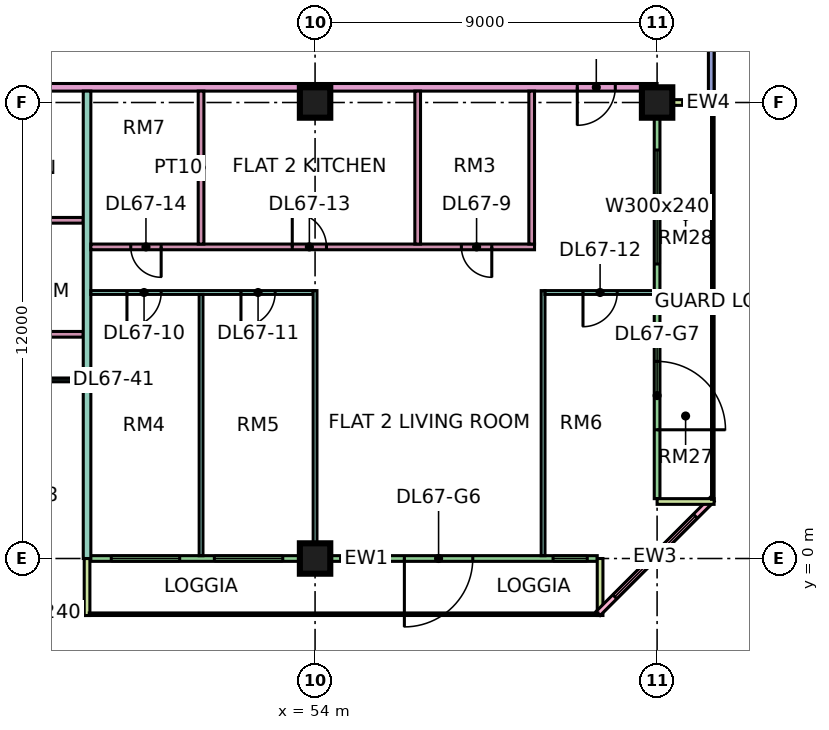
"""IFC4 building model, lengths in metres.
Left out: names, types, materials, properties, quantities, classifications, styles, units other than length and angle.
Written with IfcOpenShell. Run it as: python <this file> out.ifc"""

import sys

from ifc_helpers import new_model, si_unit, direction, frame, frame_2d, origin, origin_2d, place, context, subcontext, project, spatial, rectangle, extrude, element, fill, save


model = new_model("IFC4")
c1 = context("Model", 3, precision=1e-05, world=origin(), true_north=direction((0.0, 1.0)))
c2 = subcontext(c1, "Body", "Model", "MODEL_VIEW")
j1 = project(units=[si_unit("LENGTHUNIT", "METRE"), si_unit("PLANEANGLEUNIT", "RADIAN")], contexts=[c1])
p1 = place(None, origin())
s1 = spatial("IfcSite", under=j1, at=p1, CompositionType="ELEMENT")
p2 = place(p1, origin())
s2 = spatial("IfcBuilding", under=s1, at=p2, CompositionType="ELEMENT")
p3 = place(p2, frame((0.0, 0.0, 288.4)))
s3 = spatial("IfcBuildingStorey", under=s2, at=p3, CompositionType="ELEMENT", Elevation=288.4)
for number, where, z_axis, x_axis in (
    (1, (54.0, 0.0, 0.0), (0.0, 0.0, 1.0), (1.0, 0.0, 0.0)),
    (2, (54.0, 12.0, 0.0), (0.0, 0.0, 1.0), (1.0, 0.0, 0.0)),
    (3, (63.0, 12.0, 0.0), (0.0, 0.0, 1.0), (1.0, 0.0, 0.0)),
):
    element("IfcColumn", number, at=place(p3, frame(where, z_axis=z_axis, x_axis=x_axis)), inside=s3, PredefinedType="COLUMN", context=c2, shape_type="SweptSolid", body=[
        extrude(rectangle(XDim=0.8, YDim=0.8, at=origin_2d()), origin(), (0.0, 0.0, 1.0), 3.75),
    ])
p4 = place(p3, frame((36.075, -1.425, 0.0), z_axis=(0.0, 0.0, 1.0), x_axis=(1.0, 0.0, 0.0)))
e4 = element("IfcWall", 4, at=p4, inside=s3, PredefinedType="SOLIDWALL", context=c2, shape_type="SweptSolid", body=[
    extrude(rectangle(XDim=11.85, YDim=0.15, at=frame_2d((5.925, 0.0))), origin(), (0.0, 0.0, 1.0), 3.35),
])
p5 = place(p4, frame((1.462, 0.0, 0.45)))
e5 = element("IfcOpeningElement", 5, at=p5, cuts=e4, PredefinedType="OPENING", context=c2, shape_type="SweptSolid", body=[
    extrude(rectangle(XDim=3.0, YDim=2.4, at=frame_2d((1.5, 1.2))), frame((0.0, 0.085, 0.0), z_axis=(0.0, -1.0, 0.0), x_axis=(1.0, 0.0, 0.0)), (0.0, 0.0, 1.0), 0.17),
])
p6 = place(p4, frame((6.525, 0.0, 0.45)))
e6 = element("IfcOpeningElement", 6, at=p6, cuts=e4, PredefinedType="OPENING", context=c2, shape_type="SweptSolid", body=[
    extrude(rectangle(XDim=1.8, YDim=2.4, at=frame_2d((0.9, 1.2))), frame((0.0, 0.085, 0.0), z_axis=(0.0, -1.0, 0.0), x_axis=(1.0, 0.0, 0.0)), (0.0, 0.0, 1.0), 0.17),
])
p7 = place(p4, frame((9.488, 0.0, 0.45)))
e7 = element("IfcOpeningElement", 7, at=p7, cuts=e4, PredefinedType="OPENING", context=c2, shape_type="SweptSolid", body=[
    extrude(rectangle(XDim=1.8, YDim=2.4, at=frame_2d((0.9, 1.2))), frame((0.0, 0.085, 0.0), z_axis=(0.0, -1.0, 0.0), x_axis=(1.0, 0.0, 0.0)), (0.0, 0.0, 1.0), 0.17),
])
p8 = place(p3, frame((48.075, 0.0, 0.0), z_axis=(0.0, 0.0, 1.0), x_axis=(1.0, 0.0, 0.0)))
e8 = element("IfcWall", 8, at=p8, inside=s3, PredefinedType="SOLIDWALL", context=c2, shape_type="SweptSolid", body=[
    extrude(rectangle(XDim=13.35, YDim=0.15, at=frame_2d((6.675, 0.0))), origin(), (0.0, 0.0, 1.0), 3.35),
])
p9 = place(p8, frame((0.562, 0.0, 0.45)))
e9 = element("IfcOpeningElement", 9, at=p9, cuts=e8, PredefinedType="OPENING", context=c2, shape_type="SweptSolid", body=[
    extrude(rectangle(XDim=1.8, YDim=2.4, at=frame_2d((0.9, 1.2))), frame((0.0, 0.085, 0.0), z_axis=(0.0, -1.0, 0.0), x_axis=(1.0, 0.0, 0.0)), (0.0, 0.0, 1.0), 0.17),
])
p10 = place(p8, frame((3.275, 0.0, 0.45)))
e10 = element("IfcOpeningElement", 10, at=p10, cuts=e8, PredefinedType="OPENING", context=c2, shape_type="SweptSolid", body=[
    extrude(rectangle(XDim=1.8, YDim=2.4, at=frame_2d((0.9, 1.2))), frame((0.0, 0.085, 0.0), z_axis=(0.0, -1.0, 0.0), x_axis=(1.0, 0.0, 0.0)), (0.0, 0.0, 1.0), 0.17),
])
p11 = place(p8, frame((8.275, 0.0, 0.0)))
e11 = element("IfcOpeningElement", 11, at=p11, cuts=e8, PredefinedType="OPENING", context=c2, shape_type="SweptSolid", body=[
    extrude(rectangle(XDim=1.8, YDim=2.4, at=frame_2d((0.9, 1.2))), frame((0.0, 0.085, 0.0), z_axis=(0.0, -1.0, 0.0), x_axis=(1.0, 0.0, 0.0)), (0.0, 0.0, 1.0), 0.17),
])
p12 = place(p8, frame((12.188, 0.0, 0.45)))
e12 = element("IfcOpeningElement", 12, at=p12, cuts=e8, PredefinedType="OPENING", context=c2, shape_type="SweptSolid", body=[
    extrude(rectangle(XDim=0.9, YDim=2.4, at=frame_2d((0.45, 1.2))), frame((0.0, 0.085, 0.0), z_axis=(0.0, -1.0, 0.0), x_axis=(1.0, 0.0, 0.0)), (0.0, 0.0, 1.0), 0.17),
])
for number, where, z_axis, x_axis in (
    (13, (48.0, -1.5, 0.0), (0.0, 0.0, 1.0), (0.0, 1.0, 0.0)),
    (14, (61.5, -1.5, 0.0), (0.0, 0.0, 1.0), (0.0, 1.0, 0.0)),
):
    element("IfcWall", number, at=place(p3, frame(where, z_axis=z_axis, x_axis=x_axis)), inside=s3, PredefinedType="SOLIDWALL", context=c2, shape_type="SweptSolid", body=[
        extrude(rectangle(XDim=1.5, YDim=0.15, at=frame_2d((0.75, 0.0))), origin(), (0.0, 0.0, 1.0), 3.35),
    ])
p13 = place(p3, frame((61.447, -1.447, 0.0), z_axis=(0.0, 0.0, 1.0), x_axis=(0.707106781187, 0.707106781187, 0.0)))
e15 = element("IfcWall", 15, at=p13, inside=s3, PredefinedType="SOLIDWALL", context=c2, shape_type="SweptSolid", body=[
    extrude(rectangle(XDim=4.243, YDim=0.15, at=frame_2d((2.121, 0.0))), origin(), (0.0, 0.0, 1.0), 3.35),
])
p14 = place(p13, frame((0.621, 0.0, 0.45)))
e16 = element("IfcOpeningElement", 16, at=p14, cuts=e15, PredefinedType="OPENING", context=c2, shape_type="SweptSolid", body=[
    extrude(rectangle(XDim=3.0, YDim=2.4, at=frame_2d((1.5, 1.2))), frame((0.0, 0.085, 0.0), z_axis=(0.0, -1.0, 0.0), x_axis=(1.0, 0.0, 0.0)), (0.0, 0.0, 1.0), 0.17),
])
p15 = place(p3, frame((63.0, 1.575, 0.0), z_axis=(0.0, 0.0, 1.0), x_axis=(0.0, 1.0, 0.0)))
e17 = element("IfcWall", 17, at=p15, inside=s3, PredefinedType="SOLIDWALL", context=c2, shape_type="SweptSolid", body=[
    extrude(rectangle(XDim=10.35, YDim=0.15, at=frame_2d((5.175, 0.0))), origin(), (0.0, 0.0, 1.0), 3.35),
])
p16 = place(p15, frame((1.812, 0.0, 0.0)))
e18 = element("IfcOpeningElement", 18, at=p16, cuts=e17, PredefinedType="OPENING", context=c2, shape_type="SweptSolid", body=[
    extrude(rectangle(XDim=1.8, YDim=2.4, at=frame_2d((0.9, 1.2))), frame((0.0, 0.085, 0.0), z_axis=(0.0, -1.0, 0.0), x_axis=(1.0, 0.0, 0.0)), (0.0, 0.0, 1.0), 0.17),
])
p17 = place(p15, frame((6.175, 0.0, 0.45)))
e19 = element("IfcOpeningElement", 19, at=p17, cuts=e17, PredefinedType="OPENING", context=c2, shape_type="SweptSolid", body=[
    extrude(rectangle(XDim=3.0, YDim=2.4, at=frame_2d((1.5, 1.2))), frame((0.0, 0.085, 0.0), z_axis=(0.0, -1.0, 0.0), x_axis=(1.0, 0.0, 0.0)), (0.0, 0.0, 1.0), 0.17),
])
for number, where, z_axis, x_axis in (
    (20, (64.5, 1.5, 0.0), (0.0, 0.0, 1.0), (-1.0, 0.0, 0.0)),
    (21, (64.5, 12.0, 0.0), (0.0, 0.0, 1.0), (-1.0, 0.0, 0.0)),
):
    element("IfcWall", number, at=place(p3, frame(where, z_axis=z_axis, x_axis=x_axis)), inside=s3, PredefinedType="SOLIDWALL", context=c2, shape_type="SweptSolid", body=[
        extrude(rectangle(XDim=1.5, YDim=0.15, at=frame_2d((0.75, 0.0))), origin(), (0.0, 0.0, 1.0), 3.35),
    ])
p18 = place(p3, frame((64.425, 12.075, 0.0), z_axis=(0.0, 0.0, 1.0), x_axis=(0.0, 1.0, 0.0)))
e22 = element("IfcWall", 22, at=p18, inside=s3, PredefinedType="SOLIDWALL", context=c2, shape_type="SweptSolid", body=[
    extrude(rectangle(XDim=10.425, YDim=0.15, at=frame_2d((5.212, 0.0))), origin(), (0.0, 0.0, 1.0), 3.35),
])
p19 = place(p18, frame((4.125, 0.0, 0.45)))
e23 = element("IfcOpeningElement", 23, at=p19, cuts=e22, PredefinedType="OPENING", context=c2, shape_type="SweptSolid", body=[
    extrude(rectangle(XDim=3.0, YDim=2.4, at=frame_2d((1.5, 1.2))), frame((0.0, 0.085, 0.0), z_axis=(0.0, -1.0, 0.0), x_axis=(1.0, 0.0, 0.0)), (0.0, 0.0, 1.0), 0.17),
])
p20 = place(p18, frame((8.175, 0.0, 0.45)))
e24 = element("IfcOpeningElement", 24, at=p20, cuts=e22, PredefinedType="OPENING", context=c2, shape_type="SweptSolid", body=[
    extrude(rectangle(XDim=1.8, YDim=2.4, at=frame_2d((0.9, 1.2))), frame((0.0, 0.085, 0.0), z_axis=(0.0, -1.0, 0.0), x_axis=(1.0, 0.0, 0.0)), (0.0, 0.0, 1.0), 0.17),
])
p21 = place(p3, frame((33.05, 4.7, 0.0), z_axis=(0.0, 0.0, 1.0), x_axis=(1.0, 0.0, 0.0)))
e25 = element("IfcWall", 25, at=p21, inside=s3, PredefinedType="PARTITIONING", context=c2, shape_type="SweptSolid", body=[
    extrude(rectangle(XDim=14.85, YDim=0.1, at=frame_2d((7.425, 0.0))), origin(), (0.0, 0.0, 1.0), 3.35),
])
p22 = place(p21, frame((10.0, 0.0, 0.0)))
e26 = element("IfcOpeningElement", 26, at=p22, cuts=e25, PredefinedType="OPENING", context=c2, shape_type="SweptSolid", body=[
    extrude(rectangle(XDim=0.9, YDim=2.1, at=frame_2d((0.45, 1.05))), frame((0.0, 0.06, 0.0), z_axis=(0.0, -1.0, 0.0), x_axis=(1.0, 0.0, 0.0)), (0.0, 0.0, 1.0), 0.12),
])
p23 = place(p21, frame((13.0, 0.0, 0.0)))
e27 = element("IfcOpeningElement", 27, at=p23, cuts=e25, PredefinedType="OPENING", context=c2, shape_type="SweptSolid", body=[
    extrude(rectangle(XDim=0.9, YDim=2.1, at=frame_2d((0.45, 1.05))), frame((0.0, 0.06, 0.0), z_axis=(0.0, -1.0, 0.0), x_axis=(1.0, 0.0, 0.0)), (0.0, 0.0, 1.0), 0.12),
])
p24 = place(p21, frame((4.0, 0.0, 0.0)))
e28 = element("IfcOpeningElement", 28, at=p24, cuts=e25, PredefinedType="OPENING", context=c2, shape_type="SweptSolid", body=[
    extrude(rectangle(XDim=0.9, YDim=2.1, at=frame_2d((0.45, 1.05))), frame((0.0, 0.06, 0.0), z_axis=(0.0, -1.0, 0.0), x_axis=(1.0, 0.0, 0.0)), (0.0, 0.0, 1.0), 0.12),
])
p25 = place(p3, frame((40.65, 12.4, 0.0), z_axis=(0.0, 0.0, 1.0), x_axis=(1.0, 0.0, 0.0)))
e29 = element("IfcWall", 29, at=p25, inside=s3, PredefinedType="PARTITIONING", context=c2, shape_type="SweptSolid", body=[
    extrude(rectangle(XDim=22.35, YDim=0.2, at=frame_2d((11.175, 0.0))), origin(), (0.0, 0.0, 1.0), 3.35),
])
p26 = place(p25, frame((20.25, 0.0, 0.0)))
e30 = element("IfcOpeningElement", 30, at=p26, cuts=e29, PredefinedType="OPENING", context=c2, shape_type="SweptSolid", body=[
    extrude(rectangle(XDim=1.0, YDim=2.1, at=frame_2d((0.5, 1.05))), frame((0.0, 0.11, 0.0), z_axis=(0.0, -1.0, 0.0), x_axis=(1.0, 0.0, 0.0)), (0.0, 0.0, 1.0), 0.22),
])
p27 = place(p25, frame((1.05, 0.0, 0.0)))
e31 = element("IfcOpeningElement", 31, at=p27, cuts=e29, PredefinedType="OPENING", context=c2, shape_type="SweptSolid", body=[
    extrude(rectangle(XDim=1.0, YDim=2.1, at=frame_2d((0.5, 1.05))), frame((0.0, 0.11, 0.0), z_axis=(0.0, -1.0, 0.0), x_axis=(1.0, 0.0, 0.0)), (0.0, 0.0, 1.0), 0.22),
])
p28 = place(p3, frame((43.725, 5.9, 0.0), z_axis=(0.0, 0.0, 1.0), x_axis=(1.0, 0.0, 0.0)))
e32 = element("IfcWall", 32, at=p28, inside=s3, PredefinedType="PARTITIONING", context=c2, shape_type="SweptSolid", body=[
    extrude(rectangle(XDim=4.175, YDim=0.15, at=frame_2d((2.087, 0.0))), origin(), (0.0, 0.0, 1.0), 3.35),
])
p29 = place(p28, frame((1.675, 0.0, 0.0)))
e33 = element("IfcOpeningElement", 33, at=p29, cuts=e32, PredefinedType="OPENING", context=c2, shape_type="SweptSolid", body=[
    extrude(rectangle(XDim=0.8, YDim=2.1, at=frame_2d((0.4, 1.05))), frame((0.0, 0.085, 0.0), z_axis=(0.0, -1.0, 0.0), x_axis=(1.0, 0.0, 0.0)), (0.0, 0.0, 1.0), 0.17),
])
p30 = place(p3, frame((43.725, 8.9, 0.0), z_axis=(0.0, 0.0, 1.0), x_axis=(1.0, 0.0, 0.0)))
e34 = element("IfcWall", 34, at=p30, inside=s3, PredefinedType="PARTITIONING", context=c2, shape_type="SweptSolid", body=[
    extrude(rectangle(XDim=4.175, YDim=0.15, at=frame_2d((2.087, 0.0))), origin(), (0.0, 0.0, 1.0), 3.35),
])
p31 = place(p3, frame((48.0, 0.0, 0.0), z_axis=(0.0, 0.0, 1.0), x_axis=(0.0, 1.0, 0.0)))
e35 = element("IfcWall", 35, at=p31, inside=s3, PredefinedType="PARTITIONING", context=c2, shape_type="SweptSolid", body=[
    extrude(rectangle(XDim=12.3, YDim=0.2, at=frame_2d((6.15, 0.0))), origin(), (0.0, 0.0, 1.0), 3.35),
])
p32 = place(p3, frame((48.1, 7.0, 0.0), z_axis=(0.0, 0.0, 1.0), x_axis=(1.0, 0.0, 0.0)))
e36 = element("IfcWall", 36, at=p32, inside=s3, PredefinedType="PARTITIONING", context=c2, shape_type="SweptSolid", body=[
    extrude(rectangle(XDim=5.85, YDim=0.1, at=frame_2d((2.925, 0.0))), origin(), (0.0, 0.0, 1.0), 3.35),
])
p33 = place(p32, frame((0.95, 0.0, 0.0)))
e37 = element("IfcOpeningElement", 37, at=p33, cuts=e36, PredefinedType="OPENING", context=c2, shape_type="SweptSolid", body=[
    extrude(rectangle(XDim=0.9, YDim=2.1, at=frame_2d((0.45, 1.05))), frame((0.0, 0.06, 0.0), z_axis=(0.0, -1.0, 0.0), x_axis=(1.0, 0.0, 0.0)), (0.0, 0.0, 1.0), 0.12),
])
p34 = place(p32, frame((3.95, 0.0, 0.0)))
e38 = element("IfcOpeningElement", 38, at=p34, cuts=e36, PredefinedType="OPENING", context=c2, shape_type="SweptSolid", body=[
    extrude(rectangle(XDim=0.9, YDim=2.1, at=frame_2d((0.45, 1.05))), frame((0.0, 0.06, 0.0), z_axis=(0.0, -1.0, 0.0), x_axis=(1.0, 0.0, 0.0)), (0.0, 0.0, 1.0), 0.12),
])
p35 = place(p3, frame((48.1, 8.2, 0.0), z_axis=(0.0, 0.0, 1.0), x_axis=(1.0, 0.0, 0.0)))
e39 = element("IfcWall", 39, at=p35, inside=s3, PredefinedType="PARTITIONING", context=c2, shape_type="SweptSolid", body=[
    extrude(rectangle(XDim=11.675, YDim=0.15, at=frame_2d((5.837, 0.0))), origin(), (0.0, 0.0, 1.0), 3.35),
])
p36 = place(p35, frame((9.75, 0.0, 0.0)))
e40 = element("IfcOpeningElement", 40, at=p36, cuts=e39, PredefinedType="OPENING", context=c2, shape_type="SweptSolid", body=[
    extrude(rectangle(XDim=0.8, YDim=2.1, at=frame_2d((0.4, 1.05))), frame((0.0, 0.085, 0.0), z_axis=(0.0, -1.0, 0.0), x_axis=(1.0, 0.0, 0.0)), (0.0, 0.0, 1.0), 0.17),
])
p37 = place(p35, frame((5.3, 0.0, 0.0)))
e41 = element("IfcOpeningElement", 41, at=p37, cuts=e39, PredefinedType="OPENING", context=c2, shape_type="SweptSolid", body=[
    extrude(rectangle(XDim=0.9, YDim=2.1, at=frame_2d((0.45, 1.05))), frame((0.0, 0.085, 0.0), z_axis=(0.0, -1.0, 0.0), x_axis=(1.0, 0.0, 0.0)), (0.0, 0.0, 1.0), 0.17),
])
p38 = place(p35, frame((1.05, 0.0, 0.0)))
e42 = element("IfcOpeningElement", 42, at=p38, cuts=e39, PredefinedType="OPENING", context=c2, shape_type="SweptSolid", body=[
    extrude(rectangle(XDim=0.8, YDim=2.1, at=frame_2d((0.4, 1.05))), frame((0.0, 0.085, 0.0), z_axis=(0.0, -1.0, 0.0), x_axis=(1.0, 0.0, 0.0)), (0.0, 0.0, 1.0), 0.17),
])
p39 = place(p3, frame((51.0, 0.074, 0.0), z_axis=(0.0, 0.0, 1.0), x_axis=(0.0, 1.0, 0.0)))
e43 = element("IfcWall", 43, at=p39, inside=s3, PredefinedType="PARTITIONING", context=c2, shape_type="SweptSolid", body=[
    extrude(rectangle(XDim=6.876, YDim=0.1, at=frame_2d((3.438, 0.0))), origin(), (0.0, 0.0, 1.0), 3.35),
])
p40 = place(p3, frame((51.0, 8.275, 0.0), z_axis=(0.0, 0.0, 1.0), x_axis=(0.0, 1.0, 0.0)))
e44 = element("IfcWall", 44, at=p40, inside=s3, PredefinedType="PARTITIONING", context=c2, shape_type="SweptSolid", body=[
    extrude(rectangle(XDim=4.025, YDim=0.15, at=frame_2d((2.013, 0.0))), origin(), (0.0, 0.0, 1.0), 3.35),
])
p41 = place(p3, frame((54.0, 0.074, 0.0), z_axis=(0.0, 0.0, 1.0), x_axis=(0.0, 1.0, 0.0)))
e45 = element("IfcWall", 45, at=p41, inside=s3, PredefinedType="PARTITIONING", context=c2, shape_type="SweptSolid", body=[
    extrude(rectangle(XDim=6.976, YDim=0.1, at=frame_2d((3.488, 0.0))), origin(), (0.0, 0.0, 1.0), 3.35),
])
for number, where, z_axis, x_axis in (
    (46, (56.7, 8.275, 0.0), (0.0, 0.0, 1.0), (0.0, 1.0, 0.0)),
    (47, (59.7, 8.275, 0.0), (0.0, 0.0, 1.0), (0.0, 1.0, 0.0)),
):
    element("IfcWall", number, at=place(p3, frame(where, z_axis=z_axis, x_axis=x_axis)), inside=s3, PredefinedType="PARTITIONING", context=c2, shape_type="SweptSolid", body=[
        extrude(rectangle(XDim=4.025, YDim=0.15, at=frame_2d((2.013, 0.0))), origin(), (0.0, 0.0, 1.0), 3.35),
    ])
p42 = place(p3, frame((60.0, 0.074, 0.0), z_axis=(0.0, 0.0, 1.0), x_axis=(0.0, 1.0, 0.0)))
e48 = element("IfcWall", 48, at=p42, inside=s3, PredefinedType="PARTITIONING", context=c2, shape_type="SweptSolid", body=[
    extrude(rectangle(XDim=6.976, YDim=0.1, at=frame_2d((3.488, 0.0))), origin(), (0.0, 0.0, 1.0), 3.35),
])
p43 = place(p3, frame((60.05, 7.0, 0.0), z_axis=(0.0, 0.0, 1.0), x_axis=(1.0, 0.0, 0.0)))
e49 = element("IfcWall", 49, at=p43, inside=s3, PredefinedType="PARTITIONING", context=c2, shape_type="SweptSolid", body=[
    extrude(rectangle(XDim=2.876, YDim=0.1, at=frame_2d((1.438, 0.0))), origin(), (0.0, 0.0, 1.0), 3.35),
])
p44 = place(p43, frame((1.0, 0.0, 0.0)))
e50 = element("IfcOpeningElement", 50, at=p44, cuts=e49, PredefinedType="OPENING", context=c2, shape_type="SweptSolid", body=[
    extrude(rectangle(XDim=0.9, YDim=2.1, at=frame_2d((0.45, 1.05))), frame((0.0, 0.06, 0.0), z_axis=(0.0, -1.0, 0.0), x_axis=(1.0, 0.0, 0.0)), (0.0, 0.0, 1.0), 0.12),
])
p45 = place(p7, origin())
e51 = element("IfcWindow", 51, at=p45, inside=s3, PartitioningType="SINGLE_PANEL", PredefinedType="WINDOW", context=c2, shape_type="SweptSolid", body=[
    extrude(rectangle(XDim=1.8, YDim=2.4, at=frame_2d((0.9, 1.2))), frame((0.0, 0.03, 0.0), z_axis=(0.0, -1.0, 0.0), x_axis=(1.0, 0.0, 0.0)), (0.0, 0.0, 1.0), 0.06),
])
fill(e7, e51)
p46 = place(p9, origin())
e52 = element("IfcWindow", 52, at=p46, inside=s3, PartitioningType="SINGLE_PANEL", PredefinedType="WINDOW", context=c2, shape_type="SweptSolid", body=[
    extrude(rectangle(XDim=1.8, YDim=2.4, at=frame_2d((0.9, 1.2))), frame((0.0, 0.03, 0.0), z_axis=(0.0, -1.0, 0.0), x_axis=(1.0, 0.0, 0.0)), (0.0, 0.0, 1.0), 0.06),
])
fill(e9, e52)
p47 = place(p10, origin())
e53 = element("IfcWindow", 53, at=p47, inside=s3, PartitioningType="SINGLE_PANEL", PredefinedType="WINDOW", context=c2, shape_type="SweptSolid", body=[
    extrude(rectangle(XDim=1.8, YDim=2.4, at=frame_2d((0.9, 1.2))), frame((0.0, 0.03, 0.0), z_axis=(0.0, -1.0, 0.0), x_axis=(1.0, 0.0, 0.0)), (0.0, 0.0, 1.0), 0.06),
])
fill(e10, e53)
p48 = place(p11, frame((1.8, 0.0, 0.0), z_axis=(0.0, 0.0, 1.0), x_axis=(-1.0, 0.0, 0.0)))
e54 = element("IfcDoor", 54, at=p48, inside=s3, OperationType="DOUBLE_DOOR_SINGLE_SWING", PredefinedType="DOOR", context=c2, shape_type="SweptSolid", body=[
    extrude(rectangle(XDim=1.8, YDim=2.4, at=frame_2d((0.9, 1.2))), frame((0.0, 0.025, 0.0), z_axis=(0.0, -1.0, 0.0), x_axis=(1.0, 0.0, 0.0)), (0.0, 0.0, 1.0), 0.05),
])
fill(e11, e54)
p49 = place(p12, origin())
e55 = element("IfcWindow", 55, at=p49, inside=s3, PartitioningType="SINGLE_PANEL", PredefinedType="WINDOW", context=c2, shape_type="SweptSolid", body=[
    extrude(rectangle(XDim=0.9, YDim=2.4, at=frame_2d((0.45, 1.2))), frame((0.0, 0.03, 0.0), z_axis=(0.0, -1.0, 0.0), x_axis=(1.0, 0.0, 0.0)), (0.0, 0.0, 1.0), 0.06),
])
fill(e12, e55)
p50 = place(p14, origin())
e56 = element("IfcWindow", 56, at=p50, inside=s3, PartitioningType="SINGLE_PANEL", PredefinedType="WINDOW", context=c2, shape_type="SweptSolid", body=[
    extrude(rectangle(XDim=3.0, YDim=2.4, at=frame_2d((1.5, 1.2))), frame((0.0, 0.03, 0.0), z_axis=(0.0, -1.0, 0.0), x_axis=(1.0, 0.0, 0.0)), (0.0, 0.0, 1.0), 0.06),
])
fill(e16, e56)
p51 = place(p16, frame((1.8, 0.0, 0.0), z_axis=(0.0, 0.0, 1.0), x_axis=(-1.0, 0.0, 0.0)))
e57 = element("IfcDoor", 57, at=p51, inside=s3, OperationType="DOUBLE_DOOR_SINGLE_SWING", PredefinedType="DOOR", context=c2, shape_type="SweptSolid", body=[
    extrude(rectangle(XDim=1.8, YDim=2.4, at=frame_2d((0.9, 1.2))), frame((0.0, 0.025, 0.0), z_axis=(0.0, -1.0, 0.0), x_axis=(1.0, 0.0, 0.0)), (0.0, 0.0, 1.0), 0.05),
])
fill(e18, e57)
p52 = place(p17, origin())
e58 = element("IfcWindow", 58, at=p52, inside=s3, PartitioningType="SINGLE_PANEL", PredefinedType="WINDOW", context=c2, shape_type="SweptSolid", body=[
    extrude(rectangle(XDim=3.0, YDim=2.4, at=frame_2d((1.5, 1.2))), frame((0.0, 0.03, 0.0), z_axis=(0.0, -1.0, 0.0), x_axis=(1.0, 0.0, 0.0)), (0.0, 0.0, 1.0), 0.06),
])
fill(e19, e58)
p53 = place(p36, origin())
e59 = element("IfcDoor", 59, at=p53, inside=s3, OperationType="SINGLE_SWING_RIGHT", PredefinedType="DOOR", context=c2, shape_type="SweptSolid", body=[
    extrude(rectangle(XDim=0.8, YDim=2.1, at=frame_2d((0.4, 1.05))), frame((0.0, 0.025, 0.0), z_axis=(0.0, -1.0, 0.0), x_axis=(1.0, 0.0, 0.0)), (0.0, 0.0, 1.0), 0.05),
])
fill(e40, e59)
p54 = place(p33, frame((0.9, 0.0, 0.0), z_axis=(0.0, 0.0, 1.0), x_axis=(-1.0, 0.0, 0.0)))
e60 = element("IfcDoor", 60, at=p54, inside=s3, OperationType="SINGLE_SWING_LEFT", PredefinedType="DOOR", context=c2, shape_type="SweptSolid", body=[
    extrude(rectangle(XDim=0.9, YDim=2.1, at=frame_2d((0.45, 1.05))), frame((0.0, 0.025, 0.0), z_axis=(0.0, -1.0, 0.0), x_axis=(1.0, 0.0, 0.0)), (0.0, 0.0, 1.0), 0.05),
])
fill(e37, e60)
p55 = place(p34, frame((0.9, 0.0, 0.0), z_axis=(0.0, 0.0, 1.0), x_axis=(-1.0, 0.0, 0.0)))
e61 = element("IfcDoor", 61, at=p55, inside=s3, OperationType="SINGLE_SWING_LEFT", PredefinedType="DOOR", context=c2, shape_type="SweptSolid", body=[
    extrude(rectangle(XDim=0.9, YDim=2.1, at=frame_2d((0.45, 1.05))), frame((0.0, 0.025, 0.0), z_axis=(0.0, -1.0, 0.0), x_axis=(1.0, 0.0, 0.0)), (0.0, 0.0, 1.0), 0.05),
])
fill(e38, e61)
p56 = place(p44, frame((0.9, 0.0, 0.0), z_axis=(0.0, 0.0, 1.0), x_axis=(-1.0, 0.0, 0.0)))
e62 = element("IfcDoor", 62, at=p56, inside=s3, OperationType="SINGLE_SWING_LEFT", PredefinedType="DOOR", context=c2, shape_type="SweptSolid", body=[
    extrude(rectangle(XDim=0.9, YDim=2.1, at=frame_2d((0.45, 1.05))), frame((0.0, 0.025, 0.0), z_axis=(0.0, -1.0, 0.0), x_axis=(1.0, 0.0, 0.0)), (0.0, 0.0, 1.0), 0.05),
])
fill(e50, e62)
p57 = place(p37, origin())
e63 = element("IfcDoor", 63, at=p57, inside=s3, OperationType="SINGLE_SWING_LEFT", PredefinedType="DOOR", context=c2, shape_type="SweptSolid", body=[
    extrude(rectangle(XDim=0.9, YDim=2.1, at=frame_2d((0.45, 1.05))), frame((0.0, 0.025, 0.0), z_axis=(0.0, -1.0, 0.0), x_axis=(1.0, 0.0, 0.0)), (0.0, 0.0, 1.0), 0.05),
])
fill(e41, e63)
p58 = place(p38, origin())
e64 = element("IfcDoor", 64, at=p58, inside=s3, OperationType="SINGLE_SWING_RIGHT", PredefinedType="DOOR", context=c2, shape_type="SweptSolid", body=[
    extrude(rectangle(XDim=0.8, YDim=2.1, at=frame_2d((0.4, 1.05))), frame((0.0, 0.025, 0.0), z_axis=(0.0, -1.0, 0.0), x_axis=(1.0, 0.0, 0.0)), (0.0, 0.0, 1.0), 0.05),
])
fill(e42, e64)
p59 = place(p26, frame((1.0, 0.0, 0.0), z_axis=(0.0, 0.0, 1.0), x_axis=(-1.0, 0.0, 0.0)))
e65 = element("IfcDoor", 65, at=p59, inside=s3, OperationType="SINGLE_SWING_LEFT", PredefinedType="DOOR", context=c2, shape_type="SweptSolid", body=[
    extrude(rectangle(XDim=1.0, YDim=2.1, at=frame_2d((0.5, 1.05))), frame((0.0, 0.025, 0.0), z_axis=(0.0, -1.0, 0.0), x_axis=(1.0, 0.0, 0.0)), (0.0, 0.0, 1.0), 0.05),
])
fill(e30, e65)
save(model, sys.argv[1])
